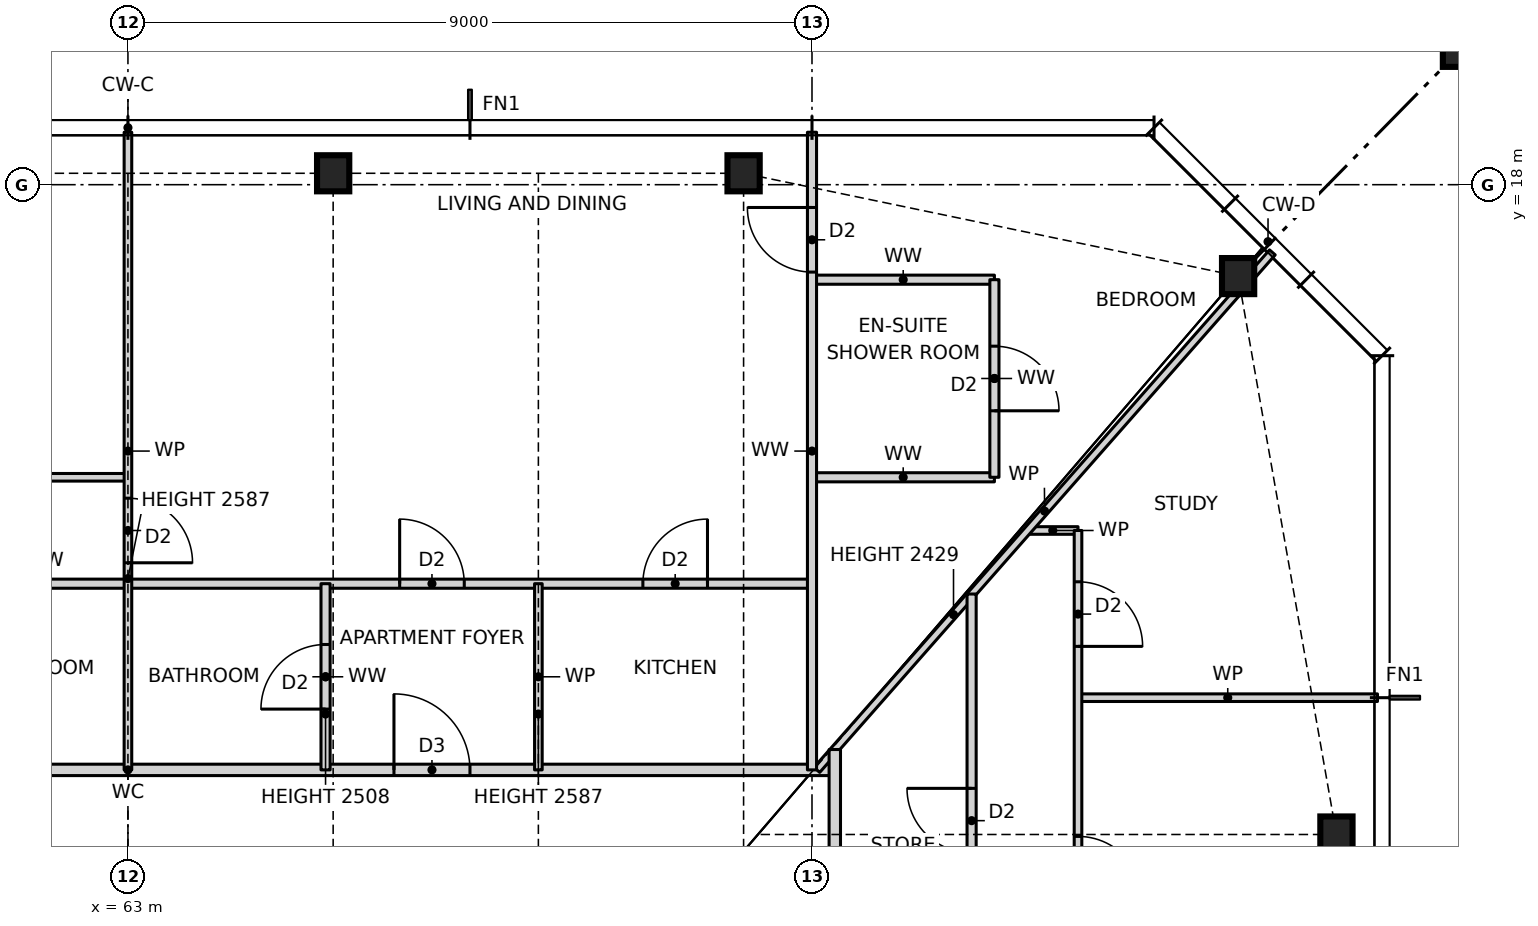
"""IFC4 building model, lengths in metres.
Left out: names, types, materials, properties, quantities, classifications, styles, units other than length and angle.
Written with IfcOpenShell. Run it as: python <this file> out.ifc"""

import sys

from ifc_helpers import new_model, si_unit, direction, frame, frame_2d, origin, origin_2d, place, context, subcontext, project, spatial, rectangle, hollow_rectangle, i_section, extrude, element, fill, save


model = new_model("IFC4")
c1 = context("Model", 3, precision=1e-05, world=origin(), true_north=direction((0.0, 1.0)))
c2 = subcontext(c1, "Body", "Model", "MODEL_VIEW")
j1 = project(units=[si_unit("LENGTHUNIT", "METRE"), si_unit("PLANEANGLEUNIT", "RADIAN")], contexts=[c1])
p1 = place(None, origin())
s1 = spatial("IfcSite", under=j1, at=p1, CompositionType="ELEMENT")
p2 = place(p1, origin())
s2 = spatial("IfcBuilding", under=s1, at=p2, CompositionType="ELEMENT")
p3 = place(p2, frame((0.0, 0.0, 60.5)))
s3 = spatial("IfcBuildingStorey", under=s2, at=p3, CompositionType="ELEMENT", Elevation=60.5)
for number, where, z_axis, x_axis in (
    (1, (78.9, 9.45, 0.0), (0.0, 0.0, 1.0), (1.0, 0.0, 0.0)),
    (2, (77.606, 16.797, 0.0), (0.0, 0.0, 1.0), (1.0, 0.0, 0.0)),
    (3, (71.1, 18.15, 0.0), (0.0, 0.0, 1.0), (1.0, 0.0, 0.0)),
    (4, (65.7, 18.15, 0.0), (0.0, 0.0, 1.0), (1.0, 0.0, 0.0)),
):
    element("IfcColumn", number, at=place(p3, frame(where, z_axis=z_axis, x_axis=x_axis)), inside=s3, PredefinedType="COLUMN", context=c2, shape_type="SweptSolid", body=[
        extrude(i_section(OverallWidth=0.424, OverallDepth=0.475, WebThickness=0.048, FlangeThickness=0.077, at=origin_2d()), origin(), (0.0, 0.0, 1.0), 3.5),
    ])
p4 = place(p3, frame((80.9, 20.15, 0.0), z_axis=(0.0, 0.0, 1.0), x_axis=(1.0, 0.0, 0.0)))
e5 = element("IfcColumn", 5, at=p4, inside=s3, PredefinedType="COLUMN", context=c2, shape_type="SweptSolid", body=[
    extrude(hollow_rectangle(XDim=1.2, YDim=1.2, WallThickness=0.07, at=origin_2d()), origin(), (0.0, 0.0, 1.0), 3.5),
])
p5 = place(p3, frame((53.7, 10.3, 0.0), z_axis=(0.0, 0.0, 1.0), x_axis=(1.0, 0.0, 0.0)))
e6 = element("IfcWall", 6, at=p5, inside=s3, PredefinedType="PARTITIONING", context=c2, shape_type="SweptSolid", body=[
    extrude(rectangle(XDim=18.6, YDim=0.15, at=frame_2d((9.3, 0.0))), origin(), (0.0, 0.0, 1.0), 3.27),
])
p6 = place(p5, frame((12.8, 0.0, 0.0)))
e7 = element("IfcOpeningElement", 7, at=p6, cuts=e6, PredefinedType="OPENING", context=c2, shape_type="SweptSolid", body=[
    extrude(rectangle(XDim=1.0, YDim=2.1, at=frame_2d((0.5, 1.05))), frame((0.0, 0.085, 0.0), z_axis=(0.0, -1.0, 0.0), x_axis=(1.0, 0.0, 0.0)), (0.0, 0.0, 1.0), 0.17),
])
p7 = place(p3, frame((75.5, 11.25, 0.0), z_axis=(0.0, 0.0, 1.0), x_axis=(1.0, 0.0, 0.0)))
e8 = element("IfcWall", 8, at=p7, inside=s3, PredefinedType="PARTITIONING", context=c2, shape_type="SweptSolid", body=[
    extrude(rectangle(XDim=3.94, YDim=0.1, at=frame_2d((1.97, 0.0))), origin(), (0.0, 0.0, 1.0), 3.27),
])
p8 = place(p3, frame((51.8, 12.75, 0.0), z_axis=(0.0, 0.0, 1.0), x_axis=(1.0, 0.0, 0.0)))
e9 = element("IfcWall", 9, at=p8, inside=s3, PredefinedType="PARTITIONING", context=c2, shape_type="SweptSolid", body=[
    extrude(rectangle(XDim=20.2, YDim=0.12, at=frame_2d((10.1, 0.0))), origin(), (0.0, 0.0, 1.0), 3.27),
])
p9 = place(p8, frame((17.975, 0.0, 0.0)))
e10 = element("IfcOpeningElement", 10, at=p9, cuts=e9, PredefinedType="OPENING", context=c2, shape_type="SweptSolid", body=[
    extrude(rectangle(XDim=0.85, YDim=2.1, at=frame_2d((0.425, 1.05))), frame((0.0, 0.07, 0.0), z_axis=(0.0, -1.0, 0.0), x_axis=(1.0, 0.0, 0.0)), (0.0, 0.0, 1.0), 0.14),
])
p10 = place(p8, frame((14.775, 0.0, 0.0)))
e11 = element("IfcOpeningElement", 11, at=p10, cuts=e9, PredefinedType="OPENING", context=c2, shape_type="SweptSolid", body=[
    extrude(rectangle(XDim=0.85, YDim=2.1, at=frame_2d((0.425, 1.05))), frame((0.0, 0.07, 0.0), z_axis=(0.0, -1.0, 0.0), x_axis=(1.0, 0.0, 0.0)), (0.0, 0.0, 1.0), 0.14),
])
p11 = place(p8, frame((9.125, 0.0, 0.0)))
e12 = element("IfcOpeningElement", 12, at=p11, cuts=e9, PredefinedType="OPENING", context=c2, shape_type="SweptSolid", body=[
    extrude(rectangle(XDim=0.85, YDim=2.1, at=frame_2d((0.425, 1.05))), frame((0.0, 0.07, 0.0), z_axis=(0.0, -1.0, 0.0), x_axis=(1.0, 0.0, 0.0)), (0.0, 0.0, 1.0), 0.14),
])
p12 = place(p8, frame((3.525, 0.0, 0.0)))
e13 = element("IfcOpeningElement", 13, at=p12, cuts=e9, PredefinedType="OPENING", context=c2, shape_type="SweptSolid", body=[
    extrude(rectangle(XDim=0.85, YDim=2.1, at=frame_2d((0.425, 1.05))), frame((0.0, 0.07, 0.0), z_axis=(0.0, -1.0, 0.0), x_axis=(1.0, 0.0, 0.0)), (0.0, 0.0, 1.0), 0.14),
])
p13 = place(p3, frame((74.836, 13.45, 0.0), z_axis=(0.0, 0.0, 1.0), x_axis=(1.0, 0.0, 0.0)))
e14 = element("IfcWall", 14, at=p13, inside=s3, PredefinedType="PARTITIONING", context=c2, shape_type="SweptSolid", body=[
    extrude(rectangle(XDim=0.664, YDim=0.1, at=frame_2d((0.332, 0.0))), origin(), (0.0, 0.0, 1.0), 3.27),
])
p14 = place(p3, frame((51.8, 14.15, 0.0), z_axis=(0.0, 0.0, 1.0), x_axis=(1.0, 0.0, 0.0)))
e15 = element("IfcWall", 15, at=p14, inside=s3, PredefinedType="PARTITIONING", context=c2, shape_type="SweptSolid", body=[
    extrude(rectangle(XDim=11.2, YDim=0.1, at=frame_2d((5.6, 0.0))), origin(), (0.0, 0.0, 1.0), 3.27),
])
p15 = place(p14, frame((8.525, 0.0, 0.0)))
e16 = element("IfcOpeningElement", 16, at=p15, cuts=e15, PredefinedType="OPENING", context=c2, shape_type="SweptSolid", body=[
    extrude(rectangle(XDim=0.85, YDim=2.1, at=frame_2d((0.425, 1.05))), frame((0.0, 0.06, 0.0), z_axis=(0.0, -1.0, 0.0), x_axis=(1.0, 0.0, 0.0)), (0.0, 0.0, 1.0), 0.12),
])
p16 = place(p14, frame((4.025, 0.0, 0.0)))
e17 = element("IfcOpeningElement", 17, at=p16, cuts=e15, PredefinedType="OPENING", context=c2, shape_type="SweptSolid", body=[
    extrude(rectangle(XDim=0.85, YDim=2.1, at=frame_2d((0.425, 1.05))), frame((0.0, 0.06, 0.0), z_axis=(0.0, -1.0, 0.0), x_axis=(1.0, 0.0, 0.0)), (0.0, 0.0, 1.0), 0.12),
])
p17 = place(p14, frame((0.675, 0.0, 0.0)))
e18 = element("IfcOpeningElement", 18, at=p17, cuts=e15, PredefinedType="OPENING", context=c2, shape_type="SweptSolid", body=[
    extrude(rectangle(XDim=0.85, YDim=2.1, at=frame_2d((0.425, 1.05))), frame((0.0, 0.06, 0.0), z_axis=(0.0, -1.0, 0.0), x_axis=(1.0, 0.0, 0.0)), (0.0, 0.0, 1.0), 0.12),
])
for number, where, z_axis, x_axis in (
    (19, (72.0, 14.15, 0.0), (0.0, 0.0, 1.0), (1.0, 0.0, 0.0)),
    (20, (72.0, 16.75, 0.0), (0.0, 0.0, 1.0), (1.0, 0.0, 0.0)),
):
    element("IfcWall", number, at=place(p3, frame(where, z_axis=z_axis, x_axis=x_axis)), inside=s3, PredefinedType="PARTITIONING", context=c2, shape_type="SweptSolid", body=[
        extrude(rectangle(XDim=2.4, YDim=0.12, at=frame_2d((1.2, 0.0))), origin(), (0.0, 0.0, 1.0), 3.27),
    ])
p18 = place(p3, frame((72.064, 10.3, 0.0), z_axis=(0.0, 0.0, 1.0), x_axis=(0.660700699661, 0.750649442461, 0.0)))
e21 = element("IfcWall", 21, at=p18, inside=s3, PredefinedType="PARTITIONING", context=c2, shape_type="SweptSolid", body=[
    extrude(rectangle(XDim=9.071, YDim=0.1, at=frame_2d((4.535, 0.0))), origin(), (0.0, 0.0, 1.0), 2.429),
])
p19 = place(p3, frame((75.5, 2.25, 0.0), z_axis=(0.0, 0.0, 1.0), x_axis=(0.0, 1.0, 0.0)))
e22 = element("IfcWall", 22, at=p19, inside=s3, PredefinedType="PARTITIONING", context=c2, shape_type="SweptSolid", body=[
    extrude(rectangle(XDim=11.2, YDim=0.1, at=frame_2d((5.6, 0.0))), origin(), (0.0, 0.0, 1.0), 3.27),
])
p20 = place(p19, frame((1.825, 0.0, 0.0)))
e23 = element("IfcOpeningElement", 23, at=p20, cuts=e22, PredefinedType="OPENING", context=c2, shape_type="SweptSolid", body=[
    extrude(rectangle(XDim=0.85, YDim=2.1, at=frame_2d((0.425, 1.05))), frame((0.0, 0.06, 0.0), z_axis=(0.0, -1.0, 0.0), x_axis=(1.0, 0.0, 0.0)), (0.0, 0.0, 1.0), 0.12),
])
p21 = place(p19, frame((6.325, 0.0, 0.0)))
e24 = element("IfcOpeningElement", 24, at=p21, cuts=e22, PredefinedType="OPENING", context=c2, shape_type="SweptSolid", body=[
    extrude(rectangle(XDim=0.85, YDim=2.1, at=frame_2d((0.425, 1.05))), frame((0.0, 0.06, 0.0), z_axis=(0.0, -1.0, 0.0), x_axis=(1.0, 0.0, 0.0)), (0.0, 0.0, 1.0), 0.12),
])
p22 = place(p19, frame((9.675, 0.0, 0.0)))
e25 = element("IfcOpeningElement", 25, at=p22, cuts=e22, PredefinedType="OPENING", context=c2, shape_type="SweptSolid", body=[
    extrude(rectangle(XDim=0.85, YDim=2.1, at=frame_2d((0.425, 1.05))), frame((0.0, 0.06, 0.0), z_axis=(0.0, -1.0, 0.0), x_axis=(1.0, 0.0, 0.0)), (0.0, 0.0, 1.0), 0.12),
])
p23 = place(p3, frame((74.4, 14.15, 0.0), z_axis=(0.0, 0.0, 1.0), x_axis=(0.0, 1.0, 0.0)))
e26 = element("IfcWall", 26, at=p23, inside=s3, PredefinedType="PARTITIONING", context=c2, shape_type="SweptSolid", body=[
    extrude(rectangle(XDim=2.6, YDim=0.12, at=frame_2d((1.3, 0.0))), origin(), (0.0, 0.0, 1.0), 3.27),
])
p24 = place(p23, frame((0.875, 0.0, 0.0)))
e27 = element("IfcOpeningElement", 27, at=p24, cuts=e26, PredefinedType="OPENING", context=c2, shape_type="SweptSolid", body=[
    extrude(rectangle(XDim=0.85, YDim=2.1, at=frame_2d((0.425, 1.05))), frame((0.0, 0.07, 0.0), z_axis=(0.0, -1.0, 0.0), x_axis=(1.0, 0.0, 0.0)), (0.0, 0.0, 1.0), 0.14),
])
p25 = place(p3, frame((74.1, -12.614, 0.0), z_axis=(0.0, 0.0, 1.0), x_axis=(0.0, 1.0, 0.0)))
e28 = element("IfcWall", 28, at=p25, inside=s3, PredefinedType="PARTITIONING", context=c2, shape_type="SweptSolid", body=[
    extrude(rectangle(XDim=25.228, YDim=0.12, at=frame_2d((12.614, 0.0))), origin(), (0.0, 0.0, 1.0), 3.27),
])
p26 = place(p25, frame((7.239, 0.0, 0.0)))
e29 = element("IfcOpeningElement", 29, at=p26, cuts=e28, PredefinedType="OPENING", context=c2, shape_type="SweptSolid", body=[
    extrude(rectangle(XDim=0.85, YDim=2.1, at=frame_2d((0.425, 1.05))), frame((0.0, 0.07, 0.0), z_axis=(0.0, -1.0, 0.0), x_axis=(1.0, 0.0, 0.0)), (0.0, 0.0, 1.0), 0.14),
])
p27 = place(p25, frame((10.439, 0.0, 0.0)))
e30 = element("IfcOpeningElement", 30, at=p27, cuts=e28, PredefinedType="OPENING", context=c2, shape_type="SweptSolid", body=[
    extrude(rectangle(XDim=0.85, YDim=2.1, at=frame_2d((0.425, 1.05))), frame((0.0, 0.07, 0.0), z_axis=(0.0, -1.0, 0.0), x_axis=(1.0, 0.0, 0.0)), (0.0, 0.0, 1.0), 0.14),
])
p28 = place(p25, frame((2.507, 0.0, 0.0)))
e31 = element("IfcOpeningElement", 31, at=p28, cuts=e28, PredefinedType="OPENING", context=c2, shape_type="SweptSolid", body=[
    extrude(rectangle(XDim=0.85, YDim=2.1, at=frame_2d((0.425, 1.05))), frame((0.0, 0.07, 0.0), z_axis=(0.0, -1.0, 0.0), x_axis=(1.0, 0.0, 0.0)), (0.0, 0.0, 1.0), 0.14),
])
p29 = place(p25, frame((16.639, 0.0, 0.0)))
e32 = element("IfcOpeningElement", 32, at=p29, cuts=e28, PredefinedType="OPENING", context=c2, shape_type="SweptSolid", body=[
    extrude(rectangle(XDim=0.85, YDim=2.1, at=frame_2d((0.425, 1.05))), frame((0.0, 0.07, 0.0), z_axis=(0.0, -1.0, 0.0), x_axis=(1.0, 0.0, 0.0)), (0.0, 0.0, 1.0), 0.14),
])
p30 = place(p25, frame((21.821, 0.0, 0.0)))
e33 = element("IfcOpeningElement", 33, at=p30, cuts=e28, PredefinedType="OPENING", context=c2, shape_type="SweptSolid", body=[
    extrude(rectangle(XDim=0.85, YDim=2.1, at=frame_2d((0.425, 1.05))), frame((0.0, 0.07, 0.0), z_axis=(0.0, -1.0, 0.0), x_axis=(1.0, 0.0, 0.0)), (0.0, 0.0, 1.0), 0.14),
])
p31 = place(p3, frame((72.3, -10.9, 0.0), z_axis=(0.0, 0.0, 1.0), x_axis=(0.0, 1.0, 0.0)))
e34 = element("IfcWall", 34, at=p31, inside=s3, PredefinedType="PARTITIONING", context=c2, shape_type="SweptSolid", body=[
    extrude(rectangle(XDim=21.468, YDim=0.15, at=frame_2d((10.734, 0.0))), origin(), (0.0, 0.0, 1.0), 3.27),
])
p32 = place(p31, frame((8.65, 0.0, 0.0)))
e35 = element("IfcOpeningElement", 35, at=p32, cuts=e34, PredefinedType="OPENING", context=c2, shape_type="SweptSolid", body=[
    extrude(rectangle(XDim=1.0, YDim=2.1, at=frame_2d((0.5, 1.05))), frame((0.0, 0.085, 0.0), z_axis=(0.0, -1.0, 0.0), x_axis=(1.0, 0.0, 0.0)), (0.0, 0.0, 1.0), 0.17),
])
p33 = place(p3, frame((72.0, 10.3, 0.0), z_axis=(0.0, 0.0, 1.0), x_axis=(0.0, 1.0, 0.0)))
e36 = element("IfcWall", 36, at=p33, inside=s3, PredefinedType="PARTITIONING", context=c2, shape_type="SweptSolid", body=[
    extrude(rectangle(XDim=8.39, YDim=0.12, at=frame_2d((4.195, 0.0))), origin(), (0.0, 0.0, 1.0), 3.27),
])
p34 = place(p33, frame((6.55, 0.0, 0.0)))
e37 = element("IfcOpeningElement", 37, at=p34, cuts=e36, PredefinedType="OPENING", context=c2, shape_type="SweptSolid", body=[
    extrude(rectangle(XDim=0.85, YDim=2.1, at=frame_2d((0.425, 1.05))), frame((0.0, 0.07, 0.0), z_axis=(0.0, -1.0, 0.0), x_axis=(1.0, 0.0, 0.0)), (0.0, 0.0, 1.0), 0.14),
])
p35 = place(p3, frame((68.4, 10.3, 0.0), z_axis=(0.0, 0.0, 1.0), x_axis=(0.0, 1.0, 0.0)))
e38 = element("IfcWall", 38, at=p35, inside=s3, PredefinedType="PARTITIONING", context=c2, shape_type="SweptSolid", body=[
    extrude(rectangle(XDim=2.45, YDim=0.1, at=frame_2d((1.225, 0.0))), origin(), (0.0, 0.0, 1.0), 2.587),
])
p36 = place(p3, frame((65.6, 10.3, 0.0), z_axis=(0.0, 0.0, 1.0), x_axis=(0.0, 1.0, 0.0)))
e39 = element("IfcWall", 39, at=p36, inside=s3, PredefinedType="PARTITIONING", context=c2, shape_type="SweptSolid", body=[
    extrude(rectangle(XDim=2.45, YDim=0.12, at=frame_2d((1.225, 0.0))), origin(), (0.0, 0.0, 1.0), 2.508),
])
p37 = place(p36, frame((0.8, 0.0, 0.0)))
e40 = element("IfcOpeningElement", 40, at=p37, cuts=e39, PredefinedType="OPENING", context=c2, shape_type="SweptSolid", body=[
    extrude(rectangle(XDim=0.85, YDim=2.1, at=frame_2d((0.425, 1.05))), frame((0.0, 0.07, 0.0), z_axis=(0.0, -1.0, 0.0), x_axis=(1.0, 0.0, 0.0)), (0.0, 0.0, 1.0), 0.14),
])
p38 = place(p3, frame((63.0, 10.3, 0.0), z_axis=(0.0, 0.0, 1.0), x_axis=(0.0, 1.0, 0.0)))
e41 = element("IfcWall", 41, at=p38, inside=s3, PredefinedType="PARTITIONING", context=c2, shape_type="SweptSolid", body=[
    extrude(rectangle(XDim=8.39, YDim=0.1, at=frame_2d((4.195, 0.0))), origin(), (0.0, 0.0, 1.0), 2.587),
])
p39 = place(p38, frame((2.725, 0.0, 0.0)))
e42 = element("IfcOpeningElement", 42, at=p39, cuts=e41, PredefinedType="OPENING", context=c2, shape_type="SweptSolid", body=[
    extrude(rectangle(XDim=0.85, YDim=2.1, at=frame_2d((0.425, 1.05))), frame((0.0, 0.06, 0.0), z_axis=(0.0, -1.0, 0.0), x_axis=(1.0, 0.0, 0.0)), (0.0, 0.0, 1.0), 0.12),
])
p40 = place(p21, frame((0.85, 0.0, 0.0), z_axis=(0.0, 0.0, 1.0), x_axis=(-1.0, 0.0, 0.0)))
e43 = element("IfcDoor", 43, at=p40, inside=s3, OperationType="SINGLE_SWING_RIGHT", PredefinedType="DOOR", context=c2, shape_type="SweptSolid", body=[
    extrude(rectangle(XDim=0.85, YDim=2.1, at=frame_2d((0.425, 1.05))), frame((0.0, 0.025, 0.0), z_axis=(0.0, -1.0, 0.0), x_axis=(1.0, 0.0, 0.0)), (0.0, 0.0, 1.0), 0.05),
])
fill(e24, e43)
p41 = place(p22, frame((0.85, 0.0, 0.0), z_axis=(0.0, 0.0, 1.0), x_axis=(-1.0, 0.0, 0.0)))
e44 = element("IfcDoor", 44, at=p41, inside=s3, OperationType="SINGLE_SWING_RIGHT", PredefinedType="DOOR", context=c2, shape_type="SweptSolid", body=[
    extrude(rectangle(XDim=0.85, YDim=2.1, at=frame_2d((0.425, 1.05))), frame((0.0, 0.025, 0.0), z_axis=(0.0, -1.0, 0.0), x_axis=(1.0, 0.0, 0.0)), (0.0, 0.0, 1.0), 0.05),
])
fill(e25, e44)
p42 = place(p30, origin())
e45 = element("IfcDoor", 45, at=p42, inside=s3, OperationType="SINGLE_SWING_RIGHT", PredefinedType="DOOR", context=c2, shape_type="SweptSolid", body=[
    extrude(rectangle(XDim=0.85, YDim=2.1, at=frame_2d((0.425, 1.05))), frame((0.0, 0.025, 0.0), z_axis=(0.0, -1.0, 0.0), x_axis=(1.0, 0.0, 0.0)), (0.0, 0.0, 1.0), 0.05),
])
fill(e33, e45)
p43 = place(p9, origin())
e46 = element("IfcDoor", 46, at=p43, inside=s3, OperationType="SINGLE_SWING_RIGHT", PredefinedType="DOOR", context=c2, shape_type="SweptSolid", body=[
    extrude(rectangle(XDim=0.85, YDim=2.1, at=frame_2d((0.425, 1.05))), frame((0.0, 0.025, 0.0), z_axis=(0.0, -1.0, 0.0), x_axis=(1.0, 0.0, 0.0)), (0.0, 0.0, 1.0), 0.05),
])
fill(e10, e46)
p44 = place(p6, origin())
e47 = element("IfcDoor", 47, at=p44, inside=s3, OperationType="SINGLE_SWING_LEFT", PredefinedType="DOOR", context=c2, shape_type="SweptSolid", body=[
    extrude(rectangle(XDim=1.0, YDim=2.1, at=frame_2d((0.5, 1.05))), frame((0.0, 0.025, 0.0), z_axis=(0.0, -1.0, 0.0), x_axis=(1.0, 0.0, 0.0)), (0.0, 0.0, 1.0), 0.05),
])
fill(e7, e47)
p45 = place(p10, origin())
e48 = element("IfcDoor", 48, at=p45, inside=s3, OperationType="SINGLE_SWING_LEFT", PredefinedType="DOOR", context=c2, shape_type="SweptSolid", body=[
    extrude(rectangle(XDim=0.85, YDim=2.1, at=frame_2d((0.425, 1.05))), frame((0.0, 0.025, 0.0), z_axis=(0.0, -1.0, 0.0), x_axis=(1.0, 0.0, 0.0)), (0.0, 0.0, 1.0), 0.05),
])
fill(e11, e48)
p46 = place(p37, origin())
e49 = element("IfcDoor", 49, at=p46, inside=s3, OperationType="SINGLE_SWING_LEFT", PredefinedType="DOOR", context=c2, shape_type="SweptSolid", body=[
    extrude(rectangle(XDim=0.85, YDim=2.1, at=frame_2d((0.425, 1.05))), frame((0.0, 0.025, 0.0), z_axis=(0.0, -1.0, 0.0), x_axis=(1.0, 0.0, 0.0)), (0.0, 0.0, 1.0), 0.05),
])
fill(e40, e49)
p47 = place(p24, frame((0.85, 0.0, 0.0), z_axis=(0.0, 0.0, 1.0), x_axis=(-1.0, 0.0, 0.0)))
e50 = element("IfcDoor", 50, at=p47, inside=s3, OperationType="SINGLE_SWING_RIGHT", PredefinedType="DOOR", context=c2, shape_type="SweptSolid", body=[
    extrude(rectangle(XDim=0.85, YDim=2.1, at=frame_2d((0.425, 1.05))), frame((0.0, 0.025, 0.0), z_axis=(0.0, -1.0, 0.0), x_axis=(1.0, 0.0, 0.0)), (0.0, 0.0, 1.0), 0.05),
])
fill(e27, e50)
p48 = place(p34, origin())
e51 = element("IfcDoor", 51, at=p48, inside=s3, OperationType="SINGLE_SWING_RIGHT", PredefinedType="DOOR", context=c2, shape_type="SweptSolid", body=[
    extrude(rectangle(XDim=0.85, YDim=2.1, at=frame_2d((0.425, 1.05))), frame((0.0, 0.025, 0.0), z_axis=(0.0, -1.0, 0.0), x_axis=(1.0, 0.0, 0.0)), (0.0, 0.0, 1.0), 0.05),
])
fill(e37, e51)
p49 = place(p39, frame((0.85, 0.0, 0.0), z_axis=(0.0, 0.0, 1.0), x_axis=(-1.0, 0.0, 0.0)))
e52 = element("IfcDoor", 52, at=p49, inside=s3, OperationType="SINGLE_SWING_RIGHT", PredefinedType="DOOR", context=c2, shape_type="SweptSolid", body=[
    extrude(rectangle(XDim=0.85, YDim=2.1, at=frame_2d((0.425, 1.05))), frame((0.0, 0.025, 0.0), z_axis=(0.0, -1.0, 0.0), x_axis=(1.0, 0.0, 0.0)), (0.0, 0.0, 1.0), 0.05),
])
fill(e42, e52)
save(model, sys.argv[1])
